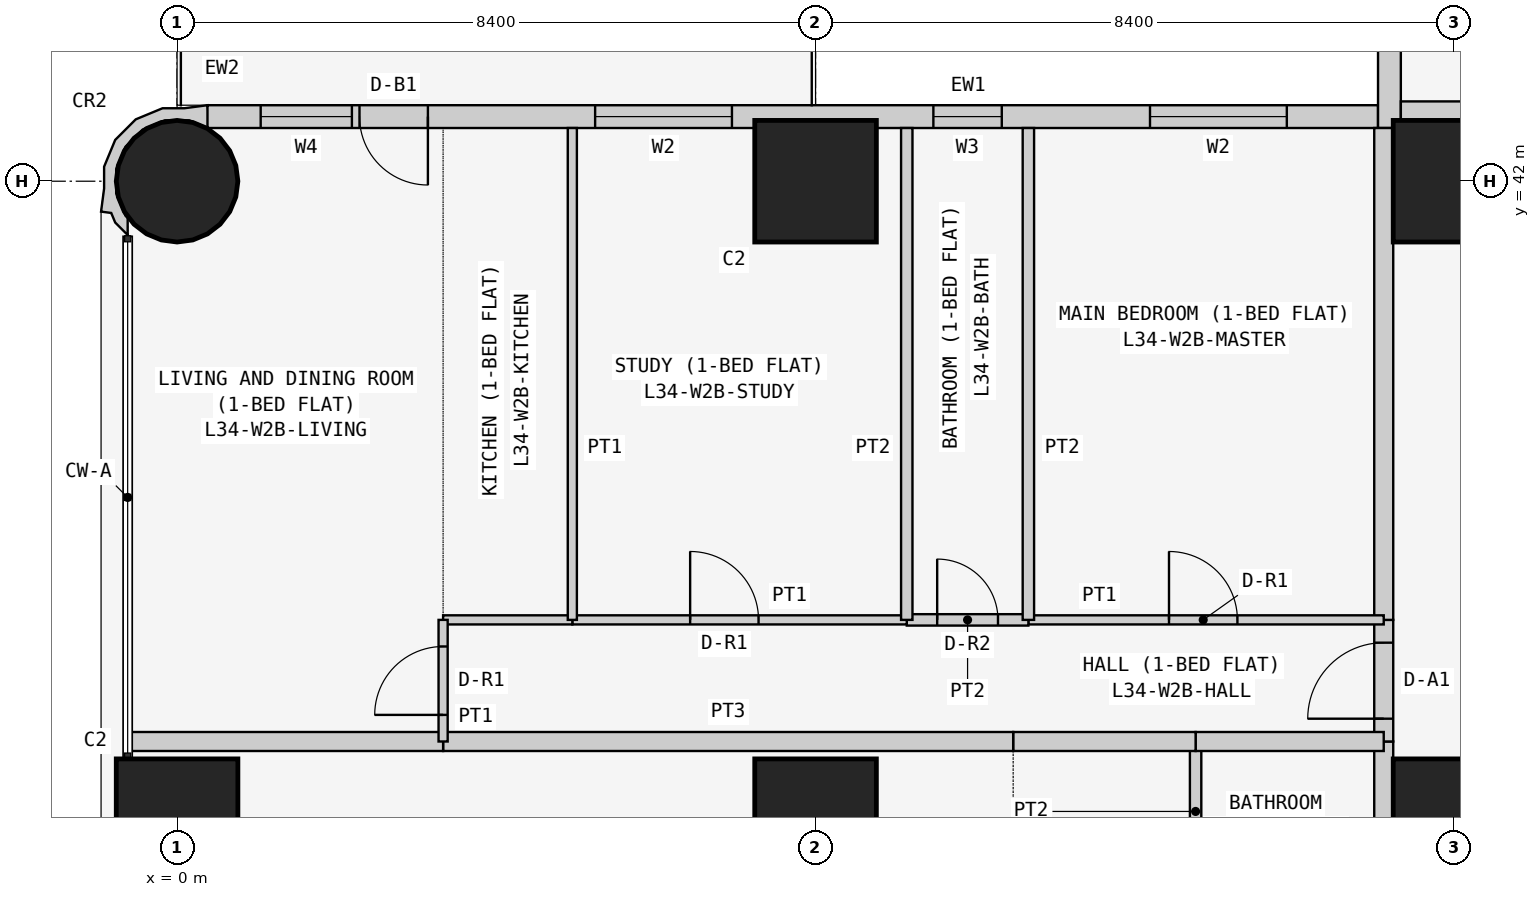
"""IFC4 building model, lengths in metres.
Left out: names, types, materials, properties, quantities, classifications, styles, units other than length and angle.
Written with IfcOpenShell. Run it as: python <this file> out.ifc"""

import sys

from ifc_helpers import new_model, si_unit, direction, frame, frame_2d, origin, origin_2d, place, context, subcontext, project, spatial, polyline, rectangle, circle, outline, extrude, element, fill, save


model = new_model("IFC4")
c1 = context("Model", 3, precision=1e-05, world=origin(), true_north=direction((0.0, 1.0)))
c2 = subcontext(c1, "Body", "Model", "MODEL_VIEW")
j1 = project(units=[si_unit("LENGTHUNIT", "METRE"), si_unit("PLANEANGLEUNIT", "RADIAN")], contexts=[c1])
p1 = place(None, origin())
s1 = spatial("IfcSite", under=j1, at=p1, CompositionType="ELEMENT")
p2 = place(p1, origin())
s2 = spatial("IfcBuilding", under=s1, at=p2, CompositionType="ELEMENT")
p3 = place(p2, frame((0.0, 0.0, 134.1)))
s3 = spatial("IfcBuildingStorey", under=s2, at=p3, CompositionType="ELEMENT", Elevation=134.1)
p4 = place(p3, frame((0.0, 33.6, 0.0), z_axis=(0.0, 0.0, 1.0), x_axis=(1.0, 0.0, 0.0)))
e1 = element("IfcColumn", 1, at=p4, inside=s3, PredefinedType="COLUMN", context=c2, shape_type="SweptSolid", body=[
    extrude(rectangle(XDim=1.6, YDim=1.6, at=origin_2d()), origin(), (0.0, 0.0, 1.0), 3.6),
])
p5 = place(p3, frame((0.0, 42.0, 0.0), z_axis=(0.0, 0.0, 1.0), x_axis=(1.0, 0.0, 0.0)))
e2 = element("IfcColumn", 2, at=p5, inside=s3, PredefinedType="COLUMN", context=c2, shape_type="SweptSolid", body=[
    extrude(circle(Radius=0.8, at=origin_2d()), origin(), (0.0, 0.0, 1.0), 3.6),
])
for number, where, z_axis, x_axis in (
    (3, (8.4, 33.6, 0.0), (0.0, 0.0, 1.0), (1.0, 0.0, 0.0)),
    (4, (8.4, 42.0, 0.0), (0.0, 0.0, 1.0), (1.0, 0.0, 0.0)),
    (5, (16.8, 33.6, 0.0), (0.0, 0.0, 1.0), (1.0, 0.0, 0.0)),
    (6, (16.8, 42.0, 0.0), (0.0, 0.0, 1.0), (1.0, 0.0, 0.0)),
):
    element("IfcColumn", number, at=place(p3, frame(where, z_axis=z_axis, x_axis=x_axis)), inside=s3, PredefinedType="COLUMN", context=c2, shape_type="SweptSolid", body=[
        extrude(rectangle(XDim=1.6, YDim=1.6, at=origin_2d()), origin(), (0.0, 0.0, 1.0), 3.6),
    ])
p6 = place(p3, frame((15.8, 42.85, 0.0), z_axis=(0.0, 0.0, 1.0), x_axis=(-1.0, 0.0, 0.0)))
e7 = element("IfcWall", 7, at=p6, inside=s3, PredefinedType="SOLIDWALL", context=c2, shape_type="SweptSolid", body=[
    extrude(rectangle(XDim=15.4, YDim=0.3, at=frame_2d((7.7, 0.0))), origin(), (0.0, 0.0, 1.0), 3.45),
])
p7 = place(p6, frame((1.2, 0.0, 0.9)))
e8 = element("IfcOpeningElement", 8, at=p7, cuts=e7, PredefinedType="OPENING", context=c2, shape_type="SweptSolid", body=[
    extrude(rectangle(XDim=1.8, YDim=1.5, at=frame_2d((0.9, 0.75))), frame((0.0, 0.16, 0.0), z_axis=(0.0, -1.0, 0.0), x_axis=(1.0, 0.0, 0.0)), (0.0, 0.0, 1.0), 0.32),
])
p8 = place(p6, frame((4.95, 0.0, 1.5)))
e9 = element("IfcOpeningElement", 9, at=p8, cuts=e7, PredefinedType="OPENING", context=c2, shape_type="SweptSolid", body=[
    extrude(rectangle(XDim=0.9, YDim=0.7, at=frame_2d((0.45, 0.35))), frame((0.0, 0.16, 0.0), z_axis=(0.0, -1.0, 0.0), x_axis=(1.0, 0.0, 0.0)), (0.0, 0.0, 1.0), 0.32),
])
p9 = place(p6, frame((8.5, 0.0, 0.9)))
e10 = element("IfcOpeningElement", 10, at=p9, cuts=e7, PredefinedType="OPENING", context=c2, shape_type="SweptSolid", body=[
    extrude(rectangle(XDim=1.8, YDim=1.5, at=frame_2d((0.9, 0.75))), frame((0.0, 0.16, 0.0), z_axis=(0.0, -1.0, 0.0), x_axis=(1.0, 0.0, 0.0)), (0.0, 0.0, 1.0), 0.32),
])
p10 = place(p6, frame((12.5, 0.0, 0.0)))
e11 = element("IfcOpeningElement", 11, at=p10, cuts=e7, PredefinedType="OPENING", context=c2, shape_type="SweptSolid", body=[
    extrude(rectangle(XDim=0.9, YDim=2.4, at=frame_2d((0.45, 1.2))), frame((0.0, 0.16, 0.0), z_axis=(0.0, -1.0, 0.0), x_axis=(1.0, 0.0, 0.0)), (0.0, 0.0, 1.0), 0.32),
])
p11 = place(p6, frame((13.5, 0.0, 0.9)))
e12 = element("IfcOpeningElement", 12, at=p11, cuts=e7, PredefinedType="OPENING", context=c2, shape_type="SweptSolid", body=[
    extrude(rectangle(XDim=1.2, YDim=1.5, at=frame_2d((0.6, 0.75))), frame((0.0, 0.16, 0.0), z_axis=(0.0, -1.0, 0.0), x_axis=(1.0, 0.0, 0.0)), (0.0, 0.0, 1.0), 0.32),
])
p12 = place(p3, frame((15.95, 50.0, 0.0), z_axis=(0.0, 0.0, 1.0), x_axis=(0.0, -1.0, 0.0)))
e13 = element("IfcWall", 13, at=p12, inside=s3, PredefinedType="SOLIDWALL", context=c2, shape_type="SweptSolid", body=[
    extrude(rectangle(XDim=7.3, YDim=0.3, at=frame_2d((3.65, 0.0))), origin(), (0.0, 0.0, 1.0), 3.45),
])
p13 = place(p12, frame((3.1, 0.0, 0.9)))
e14 = element("IfcOpeningElement", 14, at=p13, cuts=e13, PredefinedType="OPENING", context=c2, shape_type="SweptSolid", body=[
    extrude(rectangle(XDim=2.4, YDim=1.5, at=frame_2d((1.2, 0.75))), frame((0.0, 0.16, 0.0), z_axis=(0.0, -1.0, 0.0), x_axis=(1.0, 0.0, 0.0)), (0.0, 0.0, 1.0), 0.32),
])
p14 = place(p12, frame((0.75, 0.0, 0.9)))
e15 = element("IfcOpeningElement", 15, at=p14, cuts=e13, PredefinedType="OPENING", context=c2, shape_type="SweptSolid", body=[
    extrude(rectangle(XDim=1.2, YDim=1.5, at=frame_2d((0.6, 0.75))), frame((0.0, 0.16, 0.0), z_axis=(0.0, -1.0, 0.0), x_axis=(1.0, 0.0, 0.0)), (0.0, 0.0, 1.0), 0.32),
])
p15 = place(p3, frame((0.327, 42.817, 0.0), z_axis=(0.0, 0.0, 1.0), x_axis=(-0.93923434088, 0.343276641956, 0.0)))
e16 = element("IfcWall", 16, at=p15, inside=s3, PredefinedType="SOLIDWALL", context=c2, shape_type="SweptSolid", body=[
    extrude(outline(polyline([(-0.006, -0.197), (0.266, -0.055), (0.535, 0.044), (0.816, 0.302), (0.977, 0.648), (0.994, 1.03), (0.895, 1.299), (0.828, 1.598), (0.697, 1.569), (0.604, 1.67), (0.394, 1.767), (0.471, 1.556), (0.509, 1.539), (0.724, 1.304), (0.833, 1.005), (0.82, 0.687), (0.686, 0.397), (0.451, 0.182), (0.152, 0.073), (-0.116, 0.084), (-0.127, 0.078), (-0.146, 0.071), (-0.006, -0.197)])), origin(), (0.0, 0.0, 1.0), 3.45),
])
p16 = place(p3, frame((16.1, 42.925, 0.0), z_axis=(0.0, 0.0, 1.0), x_axis=(1.0, 0.0, 0.0)))
e17 = element("IfcWall", 17, at=p16, inside=s3, PredefinedType="PARTITIONING", context=c2, shape_type="SweptSolid", body=[
    extrude(rectangle(XDim=6.471, YDim=0.25, at=frame_2d((3.235, 0.0))), origin(), (0.0, 0.0, 1.0), 3.45),
])
p17 = place(p3, frame((15.875, 32.0, 0.0), z_axis=(0.0, 0.0, 1.0), x_axis=(0.0, 1.0, 0.0)))
e18 = element("IfcWall", 18, at=p17, inside=s3, PredefinedType="PARTITIONING", context=c2, shape_type="SweptSolid", body=[
    extrude(rectangle(XDim=2.629, YDim=0.25, at=frame_2d((1.314, 0.0))), origin(), (0.0, 0.0, 1.0), 3.45),
])
p18 = place(p3, frame((15.875, 34.629, 0.0), z_axis=(0.0, 0.0, 1.0), x_axis=(0.0, 1.0, 0.0)))
e19 = element("IfcWall", 19, at=p18, inside=s3, PredefinedType="PARTITIONING", context=c2, shape_type="SweptSolid", body=[
    extrude(rectangle(XDim=1.6, YDim=0.25, at=frame_2d((0.8, 0.0))), origin(), (0.0, 0.0, 1.0), 3.45),
])
p19 = place(p18, frame((0.3, 0.0, 0.0)))
e20 = element("IfcOpeningElement", 20, at=p19, cuts=e19, PredefinedType="OPENING", context=c2, shape_type="SweptSolid", body=[
    extrude(rectangle(XDim=1.0, YDim=2.1, at=frame_2d((0.5, 1.05))), frame((0.0, 0.135, 0.0), z_axis=(0.0, -1.0, 0.0), x_axis=(1.0, 0.0, 0.0)), (0.0, 0.0, 1.0), 0.27),
])
p20 = place(p3, frame((15.875, 36.229, 0.0), z_axis=(0.0, 0.0, 1.0), x_axis=(0.0, 1.0, 0.0)))
e21 = element("IfcWall", 21, at=p20, inside=s3, PredefinedType="PARTITIONING", context=c2, shape_type="SweptSolid", body=[
    extrude(rectangle(XDim=6.471, YDim=0.25, at=frame_2d((3.235, 0.0))), origin(), (0.0, 0.0, 1.0), 3.45),
])
p21 = place(p3, frame((13.4, 32.0, 0.0), z_axis=(0.0, 0.0, 1.0), x_axis=(0.0, 1.0, 0.0)))
e22 = element("IfcWall", 22, at=p21, inside=s3, PredefinedType="PARTITIONING", context=c2, shape_type="SweptSolid", body=[
    extrude(rectangle(XDim=2.629, YDim=0.15, at=frame_2d((1.314, 0.0))), origin(), (0.0, 0.0, 1.0), 3.45),
])
p22 = place(p3, frame((13.4, 34.629, 0.0), z_axis=(0.0, 0.0, 1.0), x_axis=(1.0, 0.0, 0.0)))
e23 = element("IfcWall", 23, at=p22, inside=s3, PredefinedType="PARTITIONING", context=c2, shape_type="SweptSolid", body=[
    extrude(rectangle(XDim=2.475, YDim=0.25, at=frame_2d((1.238, 0.0))), origin(), (0.0, 0.0, 1.0), 3.45),
])
p23 = place(p3, frame((11.0, 34.629, 0.0), z_axis=(0.0, 0.0, 1.0), x_axis=(1.0, 0.0, 0.0)))
e24 = element("IfcWall", 24, at=p23, inside=s3, PredefinedType="PARTITIONING", context=c2, shape_type="SweptSolid", body=[
    extrude(rectangle(XDim=2.4, YDim=0.25, at=frame_2d((1.2, 0.0))), origin(), (0.0, 0.0, 1.0), 3.45),
])
p24 = place(p3, frame((3.5, 34.629, 0.0), z_axis=(0.0, 0.0, 1.0), x_axis=(1.0, 0.0, 0.0)))
e25 = element("IfcWall", 25, at=p24, inside=s3, PredefinedType="PARTITIONING", context=c2, shape_type="SweptSolid", body=[
    extrude(rectangle(XDim=7.5, YDim=0.25, at=frame_2d((3.75, 0.0))), origin(), (0.0, 0.0, 1.0), 3.45),
])
p25 = place(p3, frame((-0.65, 34.629, 0.0), z_axis=(0.0, 0.0, 1.0), x_axis=(1.0, 0.0, 0.0)))
e26 = element("IfcWall", 26, at=p25, inside=s3, PredefinedType="PARTITIONING", context=c2, shape_type="SweptSolid", body=[
    extrude(rectangle(XDim=4.15, YDim=0.25, at=frame_2d((2.075, 0.0))), origin(), (0.0, 0.0, 1.0), 3.45),
])
p26 = place(p3, frame((11.2, 36.229, 0.0), z_axis=(0.0, 0.0, 1.0), x_axis=(1.0, 0.0, 0.0)))
e27 = element("IfcWall", 27, at=p26, inside=s3, PredefinedType="PARTITIONING", context=c2, shape_type="SweptSolid", body=[
    extrude(rectangle(XDim=4.675, YDim=0.12, at=frame_2d((2.337, 0.0))), origin(), (0.0, 0.0, 1.0), 3.45),
])
p27 = place(p26, frame((1.85, 0.0, 0.0)))
e28 = element("IfcOpeningElement", 28, at=p27, cuts=e27, PredefinedType="OPENING", context=c2, shape_type="SweptSolid", body=[
    extrude(rectangle(XDim=0.9, YDim=2.1, at=frame_2d((0.45, 1.05))), frame((0.0, 0.07, 0.0), z_axis=(0.0, -1.0, 0.0), x_axis=(1.0, 0.0, 0.0)), (0.0, 0.0, 1.0), 0.14),
])
p28 = place(p3, frame((9.6, 36.229, 0.0), z_axis=(0.0, 0.0, 1.0), x_axis=(1.0, 0.0, 0.0)))
e29 = element("IfcWall", 29, at=p28, inside=s3, PredefinedType="PARTITIONING", context=c2, shape_type="SweptSolid", body=[
    extrude(rectangle(XDim=1.6, YDim=0.15, at=frame_2d((0.8, 0.0))), origin(), (0.0, 0.0, 1.0), 3.45),
])
p29 = place(p28, frame((0.4, 0.0, 0.0)))
e30 = element("IfcOpeningElement", 30, at=p29, cuts=e29, PredefinedType="OPENING", context=c2, shape_type="SweptSolid", body=[
    extrude(rectangle(XDim=0.8, YDim=2.1, at=frame_2d((0.4, 1.05))), frame((0.0, 0.085, 0.0), z_axis=(0.0, -1.0, 0.0), x_axis=(1.0, 0.0, 0.0)), (0.0, 0.0, 1.0), 0.17),
])
p30 = place(p3, frame((5.2, 36.229, 0.0), z_axis=(0.0, 0.0, 1.0), x_axis=(1.0, 0.0, 0.0)))
e31 = element("IfcWall", 31, at=p30, inside=s3, PredefinedType="PARTITIONING", context=c2, shape_type="SweptSolid", body=[
    extrude(rectangle(XDim=4.4, YDim=0.12, at=frame_2d((2.2, 0.0))), origin(), (0.0, 0.0, 1.0), 3.45),
])
p31 = place(p30, frame((1.55, 0.0, 0.0)))
e32 = element("IfcOpeningElement", 32, at=p31, cuts=e31, PredefinedType="OPENING", context=c2, shape_type="SweptSolid", body=[
    extrude(rectangle(XDim=0.9, YDim=2.1, at=frame_2d((0.45, 1.05))), frame((0.0, 0.07, 0.0), z_axis=(0.0, -1.0, 0.0), x_axis=(1.0, 0.0, 0.0)), (0.0, 0.0, 1.0), 0.14),
])
p32 = place(p3, frame((3.5, 36.229, 0.0), z_axis=(0.0, 0.0, 1.0), x_axis=(1.0, 0.0, 0.0)))
e33 = element("IfcWall", 33, at=p32, inside=s3, PredefinedType="PARTITIONING", context=c2, shape_type="SweptSolid", body=[
    extrude(rectangle(XDim=1.7, YDim=0.12, at=frame_2d((0.85, 0.0))), origin(), (0.0, 0.0, 1.0), 3.45),
])
p33 = place(p3, frame((3.5, 34.629, 0.0), z_axis=(0.0, 0.0, 1.0), x_axis=(0.0, 1.0, 0.0)))
e34 = element("IfcWall", 34, at=p33, inside=s3, PredefinedType="PARTITIONING", context=c2, shape_type="SweptSolid", body=[
    extrude(rectangle(XDim=1.6, YDim=0.12, at=frame_2d((0.8, 0.0))), origin(), (0.0, 0.0, 1.0), 3.45),
])
p34 = place(p33, frame((0.35, 0.0, 0.0)))
e35 = element("IfcOpeningElement", 35, at=p34, cuts=e34, PredefinedType="OPENING", context=c2, shape_type="SweptSolid", body=[
    extrude(rectangle(XDim=0.9, YDim=2.1, at=frame_2d((0.45, 1.05))), frame((0.0, 0.07, 0.0), z_axis=(0.0, -1.0, 0.0), x_axis=(1.0, 0.0, 0.0)), (0.0, 0.0, 1.0), 0.14),
])
for number, where, z_axis, x_axis in (
    (36, (11.2, 36.229, 0.0), (0.0, 0.0, 1.0), (0.0, 1.0, 0.0)),
    (37, (9.6, 36.229, 0.0), (0.0, 0.0, 1.0), (0.0, 1.0, 0.0)),
):
    element("IfcWall", number, at=place(p3, frame(where, z_axis=z_axis, x_axis=x_axis)), inside=s3, PredefinedType="PARTITIONING", context=c2, shape_type="SweptSolid", body=[
        extrude(rectangle(XDim=6.471, YDim=0.15, at=frame_2d((3.235, 0.0))), origin(), (0.0, 0.0, 1.0), 3.45),
    ])
p35 = place(p3, frame((5.2, 36.229, 0.0), z_axis=(0.0, 0.0, 1.0), x_axis=(0.0, 1.0, 0.0)))
e38 = element("IfcWall", 38, at=p35, inside=s3, PredefinedType="PARTITIONING", context=c2, shape_type="SweptSolid", body=[
    extrude(rectangle(XDim=6.471, YDim=0.12, at=frame_2d((3.235, 0.0))), origin(), (0.0, 0.0, 1.0), 3.45),
])
p36 = place(p7, origin())
e39 = element("IfcWindow", 39, at=p36, inside=s3, PartitioningType="SINGLE_PANEL", PredefinedType="WINDOW", context=c2, shape_type="SweptSolid", body=[
    extrude(rectangle(XDim=1.8, YDim=1.5, at=frame_2d((0.9, 0.75))), frame((0.0, 0.03, 0.0), z_axis=(0.0, -1.0, 0.0), x_axis=(1.0, 0.0, 0.0)), (0.0, 0.0, 1.0), 0.06),
])
fill(e8, e39)
p37 = place(p8, origin())
e40 = element("IfcWindow", 40, at=p37, inside=s3, PartitioningType="SINGLE_PANEL", PredefinedType="WINDOW", context=c2, shape_type="SweptSolid", body=[
    extrude(rectangle(XDim=0.9, YDim=0.7, at=frame_2d((0.45, 0.35))), frame((0.0, 0.03, 0.0), z_axis=(0.0, -1.0, 0.0), x_axis=(1.0, 0.0, 0.0)), (0.0, 0.0, 1.0), 0.06),
])
fill(e9, e40)
p38 = place(p9, origin())
e41 = element("IfcWindow", 41, at=p38, inside=s3, PartitioningType="SINGLE_PANEL", PredefinedType="WINDOW", context=c2, shape_type="SweptSolid", body=[
    extrude(rectangle(XDim=1.8, YDim=1.5, at=frame_2d((0.9, 0.75))), frame((0.0, 0.03, 0.0), z_axis=(0.0, -1.0, 0.0), x_axis=(1.0, 0.0, 0.0)), (0.0, 0.0, 1.0), 0.06),
])
fill(e10, e41)
p39 = place(p10, origin())
e42 = element("IfcDoor", 42, at=p39, inside=s3, OperationType="SINGLE_SWING_LEFT", PredefinedType="DOOR", context=c2, shape_type="SweptSolid", body=[
    extrude(rectangle(XDim=0.9, YDim=2.4, at=frame_2d((0.45, 1.2))), frame((0.0, 0.025, 0.0), z_axis=(0.0, -1.0, 0.0), x_axis=(1.0, 0.0, 0.0)), (0.0, 0.0, 1.0), 0.05),
])
fill(e11, e42)
p40 = place(p11, origin())
e43 = element("IfcWindow", 43, at=p40, inside=s3, PartitioningType="SINGLE_PANEL", PredefinedType="WINDOW", context=c2, shape_type="SweptSolid", body=[
    extrude(rectangle(XDim=1.2, YDim=1.5, at=frame_2d((0.6, 0.75))), frame((0.0, 0.03, 0.0), z_axis=(0.0, -1.0, 0.0), x_axis=(1.0, 0.0, 0.0)), (0.0, 0.0, 1.0), 0.06),
])
fill(e12, e43)
p41 = place(p19, origin())
e44 = element("IfcDoor", 44, at=p41, inside=s3, OperationType="SINGLE_SWING_LEFT", PredefinedType="DOOR", context=c2, shape_type="SweptSolid", body=[
    extrude(rectangle(XDim=1.0, YDim=2.1, at=frame_2d((0.5, 1.05))), frame((0.0, 0.025, 0.0), z_axis=(0.0, -1.0, 0.0), x_axis=(1.0, 0.0, 0.0)), (0.0, 0.0, 1.0), 0.05),
])
fill(e20, e44)
p42 = place(p27, origin())
e45 = element("IfcDoor", 45, at=p42, inside=s3, OperationType="SINGLE_SWING_LEFT", PredefinedType="DOOR", context=c2, shape_type="SweptSolid", body=[
    extrude(rectangle(XDim=0.9, YDim=2.1, at=frame_2d((0.45, 1.05))), frame((0.0, 0.025, 0.0), z_axis=(0.0, -1.0, 0.0), x_axis=(1.0, 0.0, 0.0)), (0.0, 0.0, 1.0), 0.05),
])
fill(e28, e45)
p43 = place(p29, origin())
e46 = element("IfcDoor", 46, at=p43, inside=s3, OperationType="SINGLE_SWING_LEFT", PredefinedType="DOOR", context=c2, shape_type="SweptSolid", body=[
    extrude(rectangle(XDim=0.8, YDim=2.1, at=frame_2d((0.4, 1.05))), frame((0.0, 0.025, 0.0), z_axis=(0.0, -1.0, 0.0), x_axis=(1.0, 0.0, 0.0)), (0.0, 0.0, 1.0), 0.05),
])
fill(e30, e46)
p44 = place(p31, origin())
e47 = element("IfcDoor", 47, at=p44, inside=s3, OperationType="SINGLE_SWING_LEFT", PredefinedType="DOOR", context=c2, shape_type="SweptSolid", body=[
    extrude(rectangle(XDim=0.9, YDim=2.1, at=frame_2d((0.45, 1.05))), frame((0.0, 0.025, 0.0), z_axis=(0.0, -1.0, 0.0), x_axis=(1.0, 0.0, 0.0)), (0.0, 0.0, 1.0), 0.05),
])
fill(e32, e47)
p45 = place(p34, origin())
e48 = element("IfcDoor", 48, at=p45, inside=s3, OperationType="SINGLE_SWING_LEFT", PredefinedType="DOOR", context=c2, shape_type="SweptSolid", body=[
    extrude(rectangle(XDim=0.9, YDim=2.1, at=frame_2d((0.45, 1.05))), frame((0.0, 0.025, 0.0), z_axis=(0.0, -1.0, 0.0), x_axis=(1.0, 0.0, 0.0)), (0.0, 0.0, 1.0), 0.05),
])
fill(e35, e48)
save(model, sys.argv[1])
